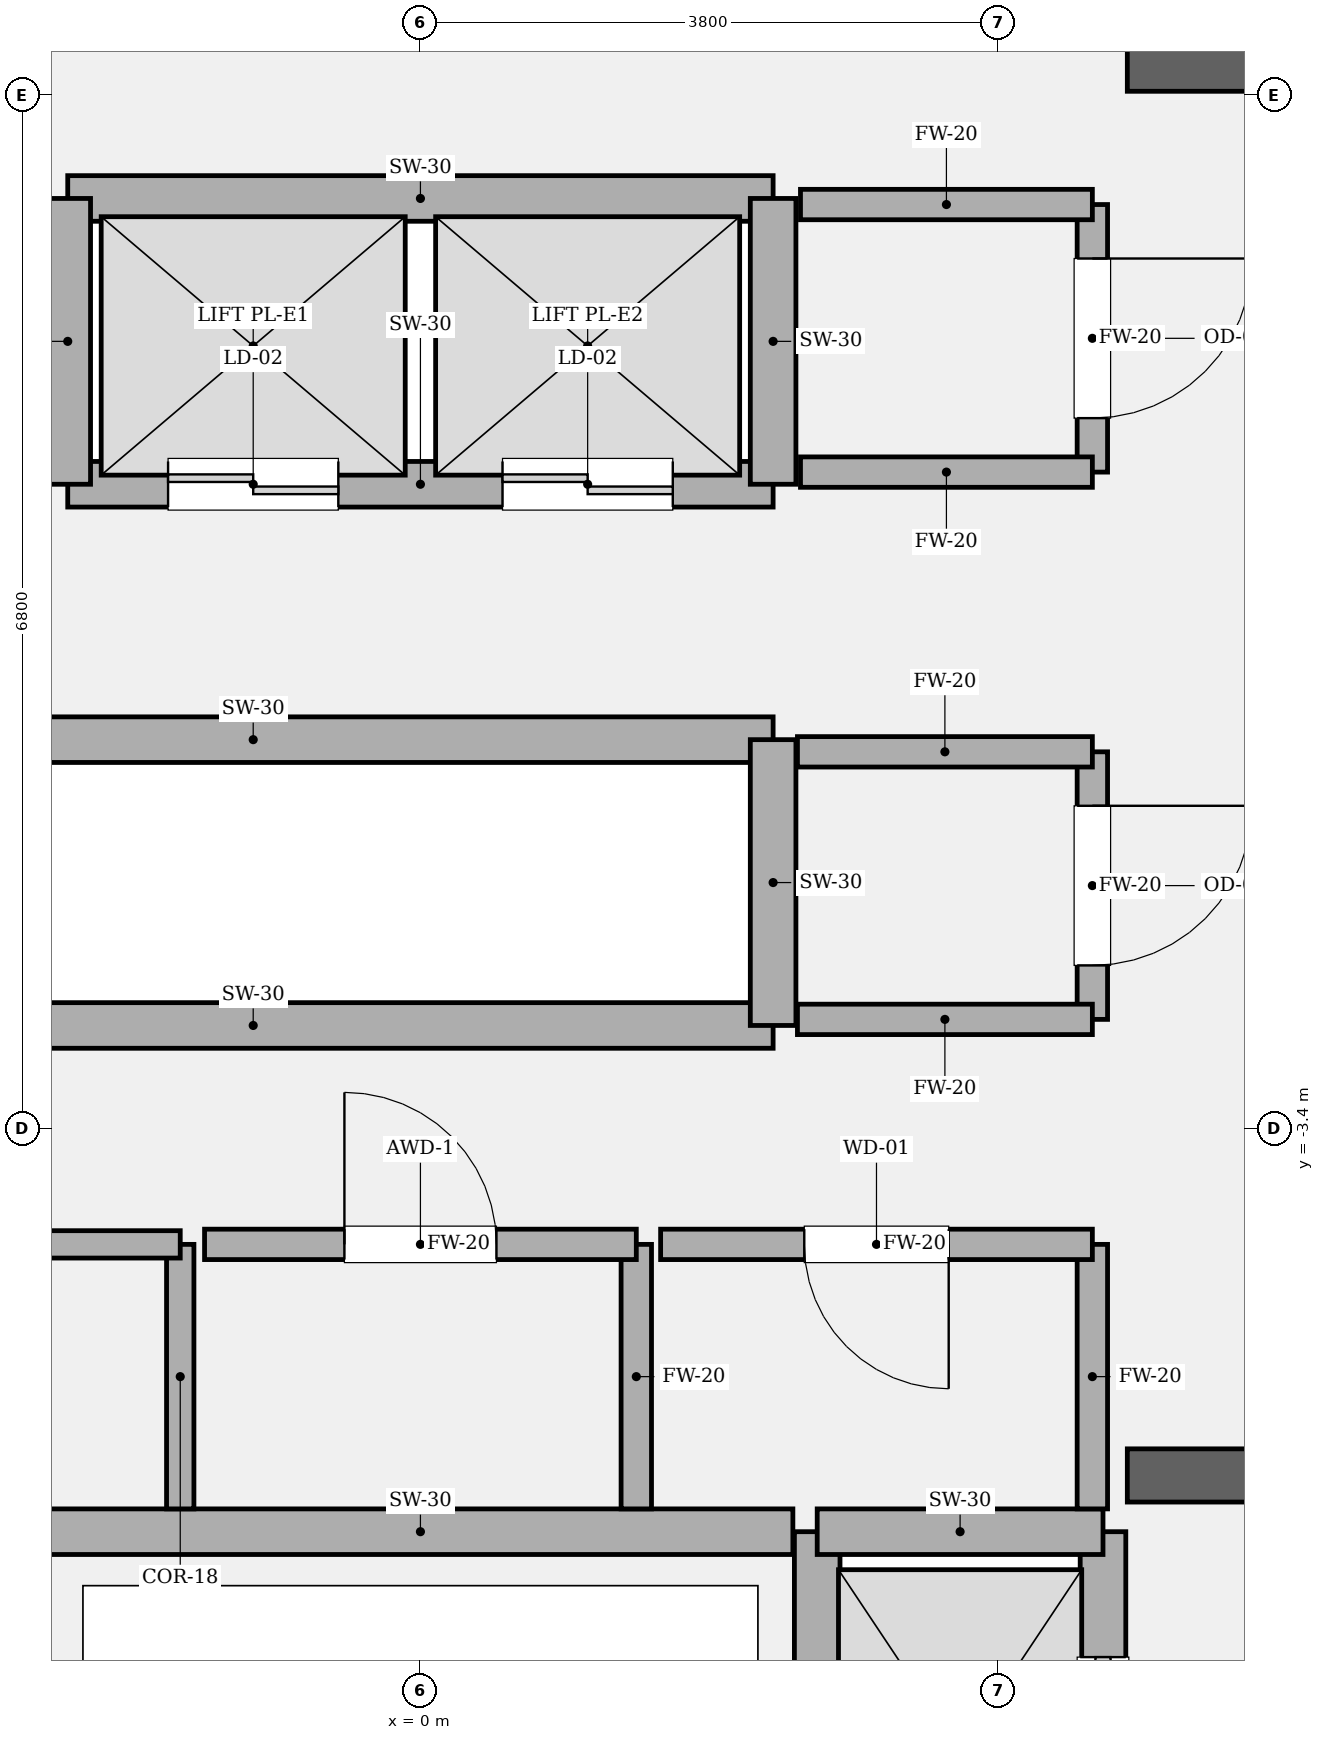
"""IFC4 building model, lengths in metres.
Left out: names, types, materials, properties, quantities, classifications, styles, units other than length and angle.
Written with IfcOpenShell. Run it as: python <this file> out.ifc"""

import sys

from ifc_helpers import new_model, si_unit, direction, frame, frame_2d, origin, place, context, subcontext, project, spatial, rectangle, extrude, element, fill, save


model = new_model("IFC4")
c1 = context("Model", 3, precision=1e-05, world=origin(), true_north=direction((0.0, 1.0)))
c2 = subcontext(c1, "Body", "Model", "MODEL_VIEW")
j1 = project(units=[si_unit("LENGTHUNIT", "METRE"), si_unit("PLANEANGLEUNIT", "RADIAN")], contexts=[c1])
p1 = place(None, origin())
s1 = spatial("IfcSite", under=j1, at=p1, CompositionType="ELEMENT")
p2 = place(p1, origin())
s2 = spatial("IfcBuilding", under=s1, at=p2, CompositionType="ELEMENT")
p3 = place(p2, frame((0.0, 0.0, 283.8)))
s3 = spatial("IfcBuildingStorey", under=s2, at=p3, CompositionType="ELEMENT", Elevation=283.8)
p4 = place(p3, frame((4.65, -5.68, 0.0), z_axis=(0.0, 0.0, 1.0), x_axis=(1.0, 0.0, 0.0)))
e1 = element("IfcWall", 1, at=p4, inside=s3, PredefinedType="SOLIDWALL", context=c2, shape_type="SweptSolid", body=[
    extrude(rectangle(XDim=5.275, YDim=0.35, at=frame_2d((2.638, 0.0))), origin(), (0.0, 0.0, 1.0), 4.2),
])
p5 = place(p4, frame((2.71, 0.0, 0.0)))
e2 = element("IfcOpeningElement", 2, at=p5, cuts=e1, PredefinedType="OPENING", context=c2, shape_type="SweptSolid", body=[
    extrude(rectangle(XDim=1.18, YDim=2.2, at=frame_2d((0.59, 1.1))), frame((0.0, 0.185, 0.0), z_axis=(0.0, -1.0, 0.0), x_axis=(1.0, 0.0, 0.0)), (0.0, 0.0, 1.0), 0.37),
])
p6 = place(p3, frame((4.65, 3.6, 0.0), z_axis=(0.0, 0.0, 1.0), x_axis=(1.0, 0.0, 0.0)))
e3 = element("IfcWall", 3, at=p6, inside=s3, PredefinedType="SOLIDWALL", context=c2, shape_type="SweptSolid", body=[
    extrude(rectangle(XDim=5.275, YDim=0.35, at=frame_2d((2.638, 0.0))), origin(), (0.0, 0.0, 1.0), 4.2),
])
p7 = place(p3, frame((4.49, -8.82, 0.0), z_axis=(0.0, 0.0, 1.0), x_axis=(0.0, 1.0, 0.0)))
e4 = element("IfcWall", 4, at=p7, inside=s3, PredefinedType="SOLIDWALL", context=c2, shape_type="SweptSolid", body=[
    extrude(rectangle(XDim=2.77, YDim=0.3, at=frame_2d((1.385, 0.0))), origin(), (0.0, 0.0, 1.0), 4.0),
])
p8 = place(p7, frame((0.825, 0.0, 0.0)))
e5 = element("IfcOpeningElement", 5, at=p8, cuts=e4, PredefinedType="OPENING", context=c2, shape_type="SweptSolid", body=[
    extrude(rectangle(XDim=1.12, YDim=2.25, at=frame_2d((0.56, 1.125))), frame((0.0, 0.16, 0.0), z_axis=(0.0, -1.0, 0.0), x_axis=(1.0, 0.0, 0.0)), (0.0, 0.0, 1.0), 0.32),
])
p9 = place(p3, frame((2.61, -8.82, 0.0), z_axis=(0.0, 0.0, 1.0), x_axis=(0.0, 1.0, 0.0)))
e6 = element("IfcWall", 6, at=p9, inside=s3, PredefinedType="SOLIDWALL", context=c2, shape_type="SweptSolid", body=[
    extrude(rectangle(XDim=2.77, YDim=0.3, at=frame_2d((1.385, 0.0))), origin(), (0.0, 0.0, 1.0), 4.0),
])
p10 = place(p3, frame((2.61, -6.05, 0.0), z_axis=(0.0, 0.0, 1.0), x_axis=(1.0, 0.0, 0.0)))
e7 = element("IfcWall", 7, at=p10, inside=s3, PredefinedType="SOLIDWALL", context=c2, shape_type="SweptSolid", body=[
    extrude(rectangle(XDim=1.88, YDim=0.3, at=frame_2d((0.94, 0.0))), origin(), (0.0, 0.0, 1.0), 4.0),
])
for number, where, z_axis, x_axis in (
    (8, (-4.52, -0.84, 0.0), (0.0, 0.0, 1.0), (1.0, 0.0, 0.0)),
    (9, (-4.52, -2.72, 0.0), (0.0, 0.0, 1.0), (1.0, 0.0, 0.0)),
):
    element("IfcWall", number, at=place(p3, frame(where, z_axis=z_axis, x_axis=x_axis)), inside=s3, PredefinedType="SOLIDWALL", context=c2, shape_type="SweptSolid", body=[
        extrude(rectangle(XDim=6.84, YDim=0.3, at=frame_2d((3.42, 0.0))), origin(), (0.0, 0.0, 1.0), 4.0),
    ])
p11 = place(p3, frame((2.32, -2.72, 0.0), z_axis=(0.0, 0.0, 1.0), x_axis=(0.0, 1.0, 0.0)))
e10 = element("IfcWall", 10, at=p11, inside=s3, PredefinedType="SOLIDWALL", context=c2, shape_type="SweptSolid", body=[
    extrude(rectangle(XDim=1.88, YDim=0.3, at=frame_2d((0.94, 0.0))), origin(), (0.0, 0.0, 1.0), 4.0),
])
p12 = place(p3, frame((-2.32, 0.84, 0.0), z_axis=(0.0, 0.0, 1.0), x_axis=(1.0, 0.0, 0.0)))
e11 = element("IfcWall", 11, at=p12, inside=s3, PredefinedType="SOLIDWALL", context=c2, shape_type="SweptSolid", body=[
    extrude(rectangle(XDim=4.64, YDim=0.3, at=frame_2d((2.32, 0.0))), origin(), (0.0, 0.0, 1.0), 4.0),
])
p13 = place(p12, frame((0.66, 0.0, 0.0)))
e12 = element("IfcOpeningElement", 12, at=p13, cuts=e11, PredefinedType="OPENING", context=c2, shape_type="SweptSolid", body=[
    extrude(rectangle(XDim=1.12, YDim=2.25, at=frame_2d((0.56, 1.125))), frame((0.0, 0.16, 0.0), z_axis=(0.0, -1.0, 0.0), x_axis=(1.0, 0.0, 0.0)), (0.0, 0.0, 1.0), 0.32),
])
p14 = place(p12, frame((2.86, 0.0, 0.0)))
e13 = element("IfcOpeningElement", 13, at=p14, cuts=e11, PredefinedType="OPENING", context=c2, shape_type="SweptSolid", body=[
    extrude(rectangle(XDim=1.12, YDim=2.25, at=frame_2d((0.56, 1.125))), frame((0.0, 0.16, 0.0), z_axis=(0.0, -1.0, 0.0), x_axis=(1.0, 0.0, 0.0)), (0.0, 0.0, 1.0), 0.32),
])
p15 = place(p3, frame((-2.32, 2.72, 0.0), z_axis=(0.0, 0.0, 1.0), x_axis=(1.0, 0.0, 0.0)))
e14 = element("IfcWall", 14, at=p15, inside=s3, PredefinedType="SOLIDWALL", context=c2, shape_type="SweptSolid", body=[
    extrude(rectangle(XDim=4.64, YDim=0.3, at=frame_2d((2.32, 0.0))), origin(), (0.0, 0.0, 1.0), 4.0),
])
for number, where, z_axis, x_axis in (
    (15, (-2.32, 0.84, 0.0), (0.0, 0.0, 1.0), (0.0, 1.0, 0.0)),
    (16, (2.32, 0.84, 0.0), (0.0, 0.0, 1.0), (0.0, 1.0, 0.0)),
):
    element("IfcWall", number, at=place(p3, frame(where, z_axis=z_axis, x_axis=x_axis)), inside=s3, PredefinedType="SOLIDWALL", context=c2, shape_type="SweptSolid", body=[
        extrude(rectangle(XDim=1.88, YDim=0.3, at=frame_2d((0.94, 0.0))), origin(), (0.0, 0.0, 1.0), 4.0),
    ])
p16 = place(p3, frame((-2.45, -6.05, 0.0), z_axis=(0.0, 0.0, 1.0), x_axis=(1.0, 0.0, 0.0)))
e17 = element("IfcWall", 17, at=p16, inside=s3, PredefinedType="SOLIDWALL", context=c2, shape_type="SweptSolid", body=[
    extrude(rectangle(XDim=4.9, YDim=0.3, at=frame_2d((2.45, 0.0))), origin(), (0.0, 0.0, 1.0), 4.0),
])
p17 = place(p3, frame((-1.58, -5.9, 0.0), z_axis=(0.0, 0.0, 1.0), x_axis=(0.0, 1.0, 0.0)))
e18 = element("IfcWall", 18, at=p17, inside=s3, PredefinedType="PARTITIONING", context=c2, shape_type="SweptSolid", body=[
    extrude(rectangle(XDim=1.74, YDim=0.18, at=frame_2d((0.87, 0.0))), origin(), (0.0, 0.0, 1.0), 4.0),
])
p18 = place(p3, frame((-1.58, -4.16, 0.0), z_axis=(0.0, 0.0, 1.0), x_axis=(-1.0, 0.0, 0.0)))
e19 = element("IfcWall", 19, at=p18, inside=s3, PredefinedType="PARTITIONING", context=c2, shape_type="SweptSolid", body=[
    extrude(rectangle(XDim=2.84, YDim=0.18, at=frame_2d((1.42, 0.0))), origin(), (0.0, 0.0, 1.0), 4.0),
])
p19 = place(p18, frame((0.895, 0.0, 0.0)))
e20 = element("IfcOpeningElement", 20, at=p19, cuts=e19, PredefinedType="OPENING", context=c2, shape_type="SweptSolid", body=[
    extrude(rectangle(XDim=1.05, YDim=2.2, at=frame_2d((0.525, 1.1))), frame((0.0, 0.1, 0.0), z_axis=(0.0, -1.0, 0.0), x_axis=(1.0, 0.0, 0.0)), (0.0, 0.0, 1.0), 0.2),
])
p20 = place(p3, frame((1.42, -5.9, 0.0), z_axis=(0.0, 0.0, 1.0), x_axis=(0.0, 1.0, 0.0)))
e21 = element("IfcWall", 21, at=p20, inside=s3, PredefinedType="SOLIDWALL", context=c2, shape_type="SweptSolid", body=[
    extrude(rectangle(XDim=1.74, YDim=0.2, at=frame_2d((0.87, 0.0))), origin(), (0.0, 0.0, 1.0), 4.0),
])
p21 = place(p3, frame((1.42, -4.16, 0.0), z_axis=(0.0, 0.0, 1.0), x_axis=(-1.0, 0.0, 0.0)))
e22 = element("IfcWall", 22, at=p21, inside=s3, PredefinedType="SOLIDWALL", context=c2, shape_type="SweptSolid", body=[
    extrude(rectangle(XDim=2.84, YDim=0.2, at=frame_2d((1.42, 0.0))), origin(), (0.0, 0.0, 1.0), 4.0),
])
p22 = place(p21, frame((0.92, 0.0, 0.0)))
e23 = element("IfcOpeningElement", 23, at=p22, cuts=e22, PredefinedType="OPENING", context=c2, shape_type="SweptSolid", body=[
    extrude(rectangle(XDim=1.0, YDim=2.15, at=frame_2d((0.5, 1.075))), frame((0.0, 0.11, 0.0), z_axis=(0.0, -1.0, 0.0), x_axis=(1.0, 0.0, 0.0)), (0.0, 0.0, 1.0), 0.22),
])
p23 = place(p3, frame((4.42, -5.9, 0.0), z_axis=(0.0, 0.0, 1.0), x_axis=(0.0, 1.0, 0.0)))
e24 = element("IfcWall", 24, at=p23, inside=s3, PredefinedType="SOLIDWALL", context=c2, shape_type="SweptSolid", body=[
    extrude(rectangle(XDim=1.74, YDim=0.2, at=frame_2d((0.87, 0.0))), origin(), (0.0, 0.0, 1.0), 4.0),
])
p24 = place(p3, frame((4.42, -4.16, 0.0), z_axis=(0.0, 0.0, 1.0), x_axis=(-1.0, 0.0, 0.0)))
e25 = element("IfcWall", 25, at=p24, inside=s3, PredefinedType="SOLIDWALL", context=c2, shape_type="SweptSolid", body=[
    extrude(rectangle(XDim=2.84, YDim=0.2, at=frame_2d((1.42, 0.0))), origin(), (0.0, 0.0, 1.0), 4.0),
])
p25 = place(p24, frame((0.945, 0.0, 0.0)))
e26 = element("IfcOpeningElement", 26, at=p25, cuts=e25, PredefinedType="OPENING", context=c2, shape_type="SweptSolid", body=[
    extrude(rectangle(XDim=0.95, YDim=2.15, at=frame_2d((0.475, 1.075))), frame((0.0, 0.11, 0.0), z_axis=(0.0, -1.0, 0.0), x_axis=(1.0, 0.0, 0.0)), (0.0, 0.0, 1.0), 0.22),
])
p26 = place(p3, frame((4.42, -2.68, 0.0), z_axis=(0.0, 0.0, 1.0), x_axis=(0.0, 1.0, 0.0)))
e27 = element("IfcWall", 27, at=p26, inside=s3, PredefinedType="SOLIDWALL", context=c2, shape_type="SweptSolid", body=[
    extrude(rectangle(XDim=1.76, YDim=0.2, at=frame_2d((0.88, 0.0))), origin(), (0.0, 0.0, 1.0), 4.0),
])
p27 = place(p26, frame((0.355, 0.0, 0.0)))
e28 = element("IfcOpeningElement", 28, at=p27, cuts=e27, PredefinedType="OPENING", context=c2, shape_type="SweptSolid", body=[
    extrude(rectangle(XDim=1.05, YDim=2.2, at=frame_2d((0.525, 1.1))), frame((0.0, 0.11, 0.0), z_axis=(0.0, -1.0, 0.0), x_axis=(1.0, 0.0, 0.0)), (0.0, 0.0, 1.0), 0.22),
])
for number, where, z_axis, x_axis in (
    (29, (4.42, -0.92, 0.0), (0.0, 0.0, 1.0), (-1.0, 0.0, 0.0)),
    (30, (2.48, -2.68, 0.0), (0.0, 0.0, 1.0), (1.0, 0.0, 0.0)),
):
    element("IfcWall", number, at=place(p3, frame(where, z_axis=z_axis, x_axis=x_axis)), inside=s3, PredefinedType="SOLIDWALL", context=c2, shape_type="SweptSolid", body=[
        extrude(rectangle(XDim=1.94, YDim=0.2, at=frame_2d((0.97, 0.0))), origin(), (0.0, 0.0, 1.0), 4.0),
    ])
p28 = place(p3, frame((4.42, 0.92, 0.0), z_axis=(0.0, 0.0, 1.0), x_axis=(0.0, 1.0, 0.0)))
e31 = element("IfcWall", 31, at=p28, inside=s3, PredefinedType="SOLIDWALL", context=c2, shape_type="SweptSolid", body=[
    extrude(rectangle(XDim=1.76, YDim=0.2, at=frame_2d((0.88, 0.0))), origin(), (0.0, 0.0, 1.0), 4.0),
])
p29 = place(p28, frame((0.355, 0.0, 0.0)))
e32 = element("IfcOpeningElement", 32, at=p29, cuts=e31, PredefinedType="OPENING", context=c2, shape_type="SweptSolid", body=[
    extrude(rectangle(XDim=1.05, YDim=2.2, at=frame_2d((0.525, 1.1))), frame((0.0, 0.11, 0.0), z_axis=(0.0, -1.0, 0.0), x_axis=(1.0, 0.0, 0.0)), (0.0, 0.0, 1.0), 0.22),
])
for number, where, z_axis, x_axis in (
    (33, (4.42, 2.68, 0.0), (0.0, 0.0, 1.0), (-1.0, 0.0, 0.0)),
    (34, (2.5, 0.92, 0.0), (0.0, 0.0, 1.0), (1.0, 0.0, 0.0)),
):
    element("IfcWall", number, at=place(p3, frame(where, z_axis=z_axis, x_axis=x_axis)), inside=s3, PredefinedType="SOLIDWALL", context=c2, shape_type="SweptSolid", body=[
        extrude(rectangle(XDim=1.92, YDim=0.2, at=frame_2d((0.96, 0.0))), origin(), (0.0, 0.0, 1.0), 4.0),
    ])
p30 = place(p8, origin())
e35 = element("IfcDoor", 35, at=p30, inside=s3, OperationType="SLIDING_TO_RIGHT", PredefinedType="DOOR", context=c2, shape_type="SweptSolid", body=[
    extrude(rectangle(XDim=1.12, YDim=2.25, at=frame_2d((0.56, 1.125))), frame((0.0, 0.025, 0.0), z_axis=(0.0, -1.0, 0.0), x_axis=(1.0, 0.0, 0.0)), (0.0, 0.0, 1.0), 0.05),
])
fill(e5, e35)
p31 = place(p13, origin())
e36 = element("IfcDoor", 36, at=p31, inside=s3, OperationType="DOUBLE_DOOR_SLIDING", PredefinedType="DOOR", context=c2, shape_type="SweptSolid", body=[
    extrude(rectangle(XDim=1.12, YDim=2.25, at=frame_2d((0.56, 1.125))), frame((0.0, 0.025, 0.0), z_axis=(0.0, -1.0, 0.0), x_axis=(1.0, 0.0, 0.0)), (0.0, 0.0, 1.0), 0.05),
])
fill(e12, e36)
p32 = place(p14, origin())
e37 = element("IfcDoor", 37, at=p32, inside=s3, OperationType="DOUBLE_DOOR_SLIDING", PredefinedType="DOOR", context=c2, shape_type="SweptSolid", body=[
    extrude(rectangle(XDim=1.12, YDim=2.25, at=frame_2d((0.56, 1.125))), frame((0.0, 0.025, 0.0), z_axis=(0.0, -1.0, 0.0), x_axis=(1.0, 0.0, 0.0)), (0.0, 0.0, 1.0), 0.05),
])
fill(e13, e37)
p33 = place(p22, origin())
e38 = element("IfcDoor", 38, at=p33, inside=s3, OperationType="SINGLE_SWING_RIGHT", PredefinedType="DOOR", context=c2, shape_type="SweptSolid", body=[
    extrude(rectangle(XDim=1.0, YDim=2.15, at=frame_2d((0.5, 1.075))), frame((0.0, 0.025, 0.0), z_axis=(0.0, -1.0, 0.0), x_axis=(1.0, 0.0, 0.0)), (0.0, 0.0, 1.0), 0.05),
])
fill(e23, e38)
p34 = place(p25, origin())
e39 = element("IfcDoor", 39, at=p34, inside=s3, OperationType="SINGLE_SWING_LEFT", PredefinedType="DOOR", context=c2, shape_type="SweptSolid", body=[
    extrude(rectangle(XDim=0.95, YDim=2.15, at=frame_2d((0.475, 1.075))), frame((0.0, 0.025, 0.0), z_axis=(0.0, -1.0, 0.0), x_axis=(1.0, 0.0, 0.0)), (0.0, 0.0, 1.0), 0.05),
])
fill(e26, e39)
p35 = place(p27, origin())
e40 = element("IfcDoor", 40, at=p35, inside=s3, OperationType="SINGLE_SWING_RIGHT", PredefinedType="DOOR", context=c2, shape_type="SweptSolid", body=[
    extrude(rectangle(XDim=1.05, YDim=2.2, at=frame_2d((0.525, 1.1))), frame((0.0, 0.025, 0.0), z_axis=(0.0, -1.0, 0.0), x_axis=(1.0, 0.0, 0.0)), (0.0, 0.0, 1.0), 0.05),
])
fill(e28, e40)
p36 = place(p29, origin())
e41 = element("IfcDoor", 41, at=p36, inside=s3, OperationType="SINGLE_SWING_RIGHT", PredefinedType="DOOR", context=c2, shape_type="SweptSolid", body=[
    extrude(rectangle(XDim=1.05, YDim=2.2, at=frame_2d((0.525, 1.1))), frame((0.0, 0.025, 0.0), z_axis=(0.0, -1.0, 0.0), x_axis=(1.0, 0.0, 0.0)), (0.0, 0.0, 1.0), 0.05),
])
fill(e32, e41)
save(model, sys.argv[1])
